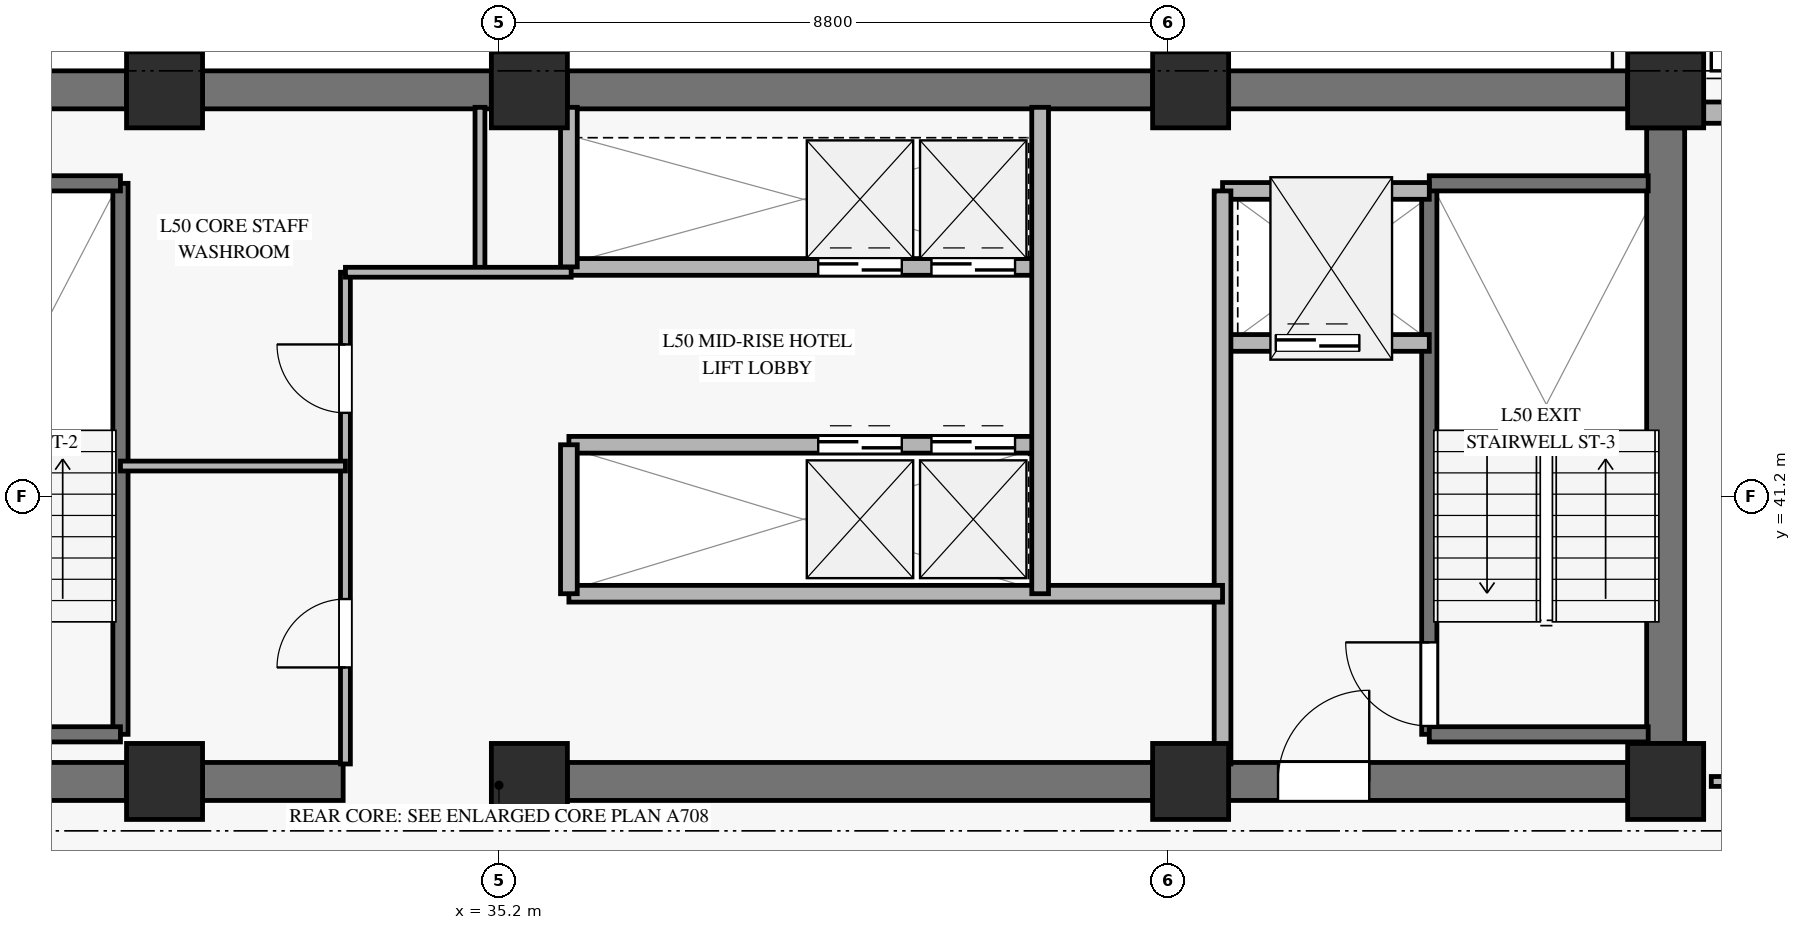
"""IFC4 building model, lengths in metres.
Left out: names, types, materials, properties, quantities, classifications, styles, units other than length and angle.
Written with IfcOpenShell. Run it as: python <this file> out.ifc"""

import sys

from ifc_helpers import new_model, si_unit, direction, frame, frame_2d, origin, origin_2d, place, context, subcontext, project, spatial, rectangle, extrude, source, transform, mapped, element, fill, save


model = new_model("IFC4")
c1 = context("Model", 3, precision=1e-05, world=origin(), true_north=direction((0.0, 1.0)))
c2 = subcontext(c1, "Body", "Model", "MODEL_VIEW")
j1 = project(units=[si_unit("LENGTHUNIT", "METRE"), si_unit("PLANEANGLEUNIT", "RADIAN")], contexts=[c1])
p1 = place(None, origin())
s1 = spatial("IfcSite", under=j1, at=p1, CompositionType="ELEMENT")
p2 = place(p1, origin())
s2 = spatial("IfcBuilding", under=s1, at=p2, CompositionType="ELEMENT")
p3 = place(p2, frame((0.0, 0.0, 199.2)))
s3 = spatial("IfcBuildingStorey", under=s2, at=p3, CompositionType="ELEMENT", Elevation=199.2)
m1 = source(origin(), c2, "Body", "SweptSolid", [
    extrude(rectangle(XDim=1.0, YDim=1.0, at=origin_2d()), origin(), (0.0, 0.0, 1.0), 3.27),
])
for number, where, z_axis, x_axis in (
    (1, (30.8, 37.45, 0.0), (0.0, 0.0, 1.0), (1.0, 0.0, 0.0)),
    (2, (30.8, 46.55, 0.0), (0.0, 0.0, 1.0), (1.0, 0.0, 0.0)),
    (3, (35.6, 37.45, 0.0), (0.0, 0.0, 1.0), (1.0, 0.0, 0.0)),
    (4, (35.6, 46.55, 0.0), (0.0, 0.0, 1.0), (1.0, 0.0, 0.0)),
    (5, (44.3, 37.45, 0.0), (0.0, 0.0, 1.0), (1.0, 0.0, 0.0)),
    (6, (44.3, 46.55, 0.0), (0.0, 0.0, 1.0), (1.0, 0.0, 0.0)),
    (7, (50.55, 37.45, 0.0), (0.0, 0.0, 1.0), (1.0, 0.0, 0.0)),
    (8, (50.55, 46.55, 0.0), (0.0, 0.0, 1.0), (1.0, 0.0, 0.0)),
):
    element("IfcColumn", number, at=place(p3, frame(where, z_axis=z_axis, x_axis=x_axis)), inside=s3, PredefinedType="PILASTER", context=c2, shape_type="MappedRepresentation", body=[
        mapped(m1, transform((0.0, 0.0, 0.0), x_axis=(1.0, 0.0, 0.0), y_axis=(0.0, 1.0, 0.0), z_axis=(0.0, 0.0, 1.0), scale=1.0)),
    ])
p4 = place(p3, frame((20.35, 46.55, 0.0), z_axis=(0.0, 0.0, 1.0), x_axis=(1.0, 0.0, 0.0)))
e9 = element("IfcWall", 9, at=p4, inside=s3, PredefinedType="SHEAR", context=c2, shape_type="SweptSolid", body=[
    extrude(rectangle(XDim=9.95, YDim=0.5, at=frame_2d((4.975, 0.0))), origin(), (0.0, 0.0, 1.0), 3.27),
])
p5 = place(p3, frame((31.3, 46.55, 0.0), z_axis=(0.0, 0.0, 1.0), x_axis=(1.0, 0.0, 0.0)))
e10 = element("IfcWall", 10, at=p5, inside=s3, PredefinedType="SHEAR", context=c2, shape_type="SweptSolid", body=[
    extrude(rectangle(XDim=3.8, YDim=0.5, at=frame_2d((1.9, 0.0))), origin(), (0.0, 0.0, 1.0), 3.27),
])
p6 = place(p3, frame((36.1, 46.55, 0.0), z_axis=(0.0, 0.0, 1.0), x_axis=(1.0, 0.0, 0.0)))
e11 = element("IfcWall", 11, at=p6, inside=s3, PredefinedType="SHEAR", context=c2, shape_type="SweptSolid", body=[
    extrude(rectangle(XDim=7.7, YDim=0.5, at=frame_2d((3.85, 0.0))), origin(), (0.0, 0.0, 1.0), 3.27),
])
p7 = place(p3, frame((44.8, 46.55, 0.0), z_axis=(0.0, 0.0, 1.0), x_axis=(1.0, 0.0, 0.0)))
e12 = element("IfcWall", 12, at=p7, inside=s3, PredefinedType="SHEAR", context=c2, shape_type="SweptSolid", body=[
    extrude(rectangle(XDim=5.25, YDim=0.5, at=frame_2d((2.625, 0.0))), origin(), (0.0, 0.0, 1.0), 3.27),
])
p8 = place(p3, frame((20.35, 37.45, 0.0), z_axis=(0.0, 0.0, 1.0), x_axis=(1.0, 0.0, 0.0)))
e13 = element("IfcWall", 13, at=p8, inside=s3, PredefinedType="SHEAR", context=c2, shape_type="SweptSolid", body=[
    extrude(rectangle(XDim=9.95, YDim=0.5, at=frame_2d((4.975, 0.0))), origin(), (0.0, 0.0, 1.0), 3.27),
])
p9 = place(p8, frame((4.2, 0.0, 0.0)))
e14 = element("IfcOpeningElement", 14, at=p9, cuts=e13, PredefinedType="OPENING", context=c2, shape_type="SweptSolid", body=[
    extrude(rectangle(XDim=1.2, YDim=2.15, at=frame_2d((0.6, 1.075))), frame((0.0, 0.26, 0.0), z_axis=(0.0, -1.0, 0.0), x_axis=(1.0, 0.0, 0.0)), (0.0, 0.0, 1.0), 0.52),
])
p10 = place(p3, frame((31.3, 37.45, 0.0), z_axis=(0.0, 0.0, 1.0), x_axis=(1.0, 0.0, 0.0)))
e15 = element("IfcWall", 15, at=p10, inside=s3, PredefinedType="SHEAR", context=c2, shape_type="SweptSolid", body=[
    extrude(rectangle(XDim=1.85, YDim=0.5, at=frame_2d((0.925, 0.0))), origin(), (0.0, 0.0, 1.0), 3.27),
])
p11 = place(p3, frame((36.1, 37.45, 0.0), z_axis=(0.0, 0.0, 1.0), x_axis=(1.0, 0.0, 0.0)))
e16 = element("IfcWall", 16, at=p11, inside=s3, PredefinedType="SHEAR", context=c2, shape_type="SweptSolid", body=[
    extrude(rectangle(XDim=7.7, YDim=0.5, at=frame_2d((3.85, 0.0))), origin(), (0.0, 0.0, 1.0), 3.27),
])
p12 = place(p3, frame((44.8, 37.45, 0.0), z_axis=(0.0, 0.0, 1.0), x_axis=(1.0, 0.0, 0.0)))
e17 = element("IfcWall", 17, at=p12, inside=s3, PredefinedType="SHEAR", context=c2, shape_type="SweptSolid", body=[
    extrude(rectangle(XDim=5.25, YDim=0.5, at=frame_2d((2.625, 0.0))), origin(), (0.0, 0.0, 1.0), 3.27),
])
p13 = place(p12, frame((0.65, 0.0, 0.0)))
e18 = element("IfcOpeningElement", 18, at=p13, cuts=e17, PredefinedType="OPENING", context=c2, shape_type="SweptSolid", body=[
    extrude(rectangle(XDim=1.2, YDim=2.15, at=frame_2d((0.6, 1.075))), frame((0.0, 0.26, 0.0), z_axis=(0.0, -1.0, 0.0), x_axis=(1.0, 0.0, 0.0)), (0.0, 0.0, 1.0), 0.52),
])
p14 = place(p3, frame((50.55, 37.95, 0.0), z_axis=(0.0, 0.0, 1.0), x_axis=(0.0, 1.0, 0.0)))
e19 = element("IfcWall", 19, at=p14, inside=s3, PredefinedType="SHEAR", context=c2, shape_type="SweptSolid", body=[
    extrude(rectangle(XDim=8.1, YDim=0.5, at=frame_2d((4.05, 0.0))), origin(), (0.0, 0.0, 1.0), 3.27),
])
p15 = place(p3, frame((51.05, 46.25, 0.0), z_axis=(0.0, 0.0, 1.0), x_axis=(1.0, 0.0, 0.0)))
e20 = element("IfcWall", 20, at=p15, inside=s3, PredefinedType="SOLIDWALL", context=c2, shape_type="SweptSolid", body=[
    extrude(rectangle(XDim=9.777, YDim=0.28, at=frame_2d((4.888, 0.0))), origin(), (0.0, 0.0, 1.0), 2.75),
])
p16 = place(p15, frame((4.089, 0.0, 0.45)))
e21 = element("IfcOpeningElement", 21, at=p16, cuts=e20, PredefinedType="OPENING", context=c2, shape_type="SweptSolid", body=[
    extrude(rectangle(XDim=1.6, YDim=2.0, at=frame_2d((0.8, 1.0))), frame((0.0, 0.15, 0.0), z_axis=(0.0, -1.0, 0.0), x_axis=(1.0, 0.0, 0.0)), (0.0, 0.0, 1.0), 0.3),
])
p17 = place(p3, frame((30.22, 38.07, 0.0), z_axis=(0.0, 0.0, 1.0), x_axis=(0.0, 1.0, 0.0)))
e22 = element("IfcWall", 22, at=p17, inside=s3, PredefinedType="SOLIDWALL", context=c2, shape_type="SweptSolid", body=[
    extrude(rectangle(XDim=7.25, YDim=0.2, at=frame_2d((3.625, 0.0))), origin(), (0.0, 0.0, 1.0), 3.5),
])
for number, where, z_axis, x_axis in (
    (23, (27.14, 45.32, 0.0), (0.0, 0.0, 1.0), (1.0, 0.0, 0.0)),
    (24, (27.14, 38.07, 0.0), (0.0, 0.0, 1.0), (1.0, 0.0, 0.0)),
):
    element("IfcWall", number, at=place(p3, frame(where, z_axis=z_axis, x_axis=x_axis)), inside=s3, PredefinedType="SOLIDWALL", context=c2, shape_type="SweptSolid", body=[
        extrude(rectangle(XDim=3.08, YDim=0.2, at=frame_2d((1.54, 0.0))), origin(), (0.0, 0.0, 1.0), 3.5),
    ])
p18 = place(p3, frame((47.44, 38.07, 0.0), z_axis=(0.0, 0.0, 1.0), x_axis=(0.0, 1.0, 0.0)))
e25 = element("IfcWall", 25, at=p18, inside=s3, PredefinedType="SOLIDWALL", context=c2, shape_type="SweptSolid", body=[
    extrude(rectangle(XDim=7.25, YDim=0.2, at=frame_2d((3.625, 0.0))), origin(), (0.0, 0.0, 1.0), 3.5),
])
p19 = place(p18, frame((0.11, 0.0, 0.0)))
e26 = element("IfcOpeningElement", 26, at=p19, cuts=e25, PredefinedType="OPENING", context=c2, shape_type="SweptSolid", body=[
    extrude(rectangle(XDim=1.1, YDim=2.15, at=frame_2d((0.55, 1.075))), frame((0.0, 0.11, 0.0), z_axis=(0.0, -1.0, 0.0), x_axis=(1.0, 0.0, 0.0)), (0.0, 0.0, 1.0), 0.22),
])
for number, where, z_axis, x_axis in (
    (27, (47.44, 45.32, 0.0), (0.0, 0.0, 1.0), (1.0, 0.0, 0.0)),
    (28, (47.44, 38.07, 0.0), (0.0, 0.0, 1.0), (1.0, 0.0, 0.0)),
):
    element("IfcWall", number, at=place(p3, frame(where, z_axis=z_axis, x_axis=x_axis)), inside=s3, PredefinedType="SOLIDWALL", context=c2, shape_type="SweptSolid", body=[
        extrude(rectangle(XDim=2.88, YDim=0.2, at=frame_2d((1.44, 0.0))), origin(), (0.0, 0.0, 1.0), 3.5),
    ])
p20 = place(p3, frame((44.72, 43.22, 0.0), z_axis=(0.0, 0.0, 1.0), x_axis=(1.0, 0.0, 0.0)))
e29 = element("IfcWall", 29, at=p20, inside=s3, PredefinedType="SOLIDWALL", context=c2, shape_type="SweptSolid", body=[
    extrude(rectangle(XDim=2.72, YDim=0.22, at=frame_2d((1.36, 0.0))), origin(), (0.0, 0.0, 1.0), 3.27),
])
p21 = place(p20, frame((0.7, 0.0, 0.0)))
e30 = element("IfcOpeningElement", 30, at=p21, cuts=e29, PredefinedType="OPENING", context=c2, shape_type="SweptSolid", body=[
    extrude(rectangle(XDim=1.1, YDim=2.2, at=frame_2d((0.55, 1.1))), frame((0.0, 0.12, 0.0), z_axis=(0.0, -1.0, 0.0), x_axis=(1.0, 0.0, 0.0)), (0.0, 0.0, 1.0), 0.24),
])
p22 = place(p3, frame((44.72, 45.22, 0.0), z_axis=(0.0, 0.0, 1.0), x_axis=(1.0, 0.0, 0.0)))
e31 = element("IfcWall", 31, at=p22, inside=s3, PredefinedType="SOLIDWALL", context=c2, shape_type="SweptSolid", body=[
    extrude(rectangle(XDim=2.72, YDim=0.22, at=frame_2d((1.36, 0.0))), origin(), (0.0, 0.0, 1.0), 3.27),
])
p23 = place(p3, frame((44.72, 37.68, 0.0), z_axis=(0.0, 0.0, 1.0), x_axis=(0.0, 1.0, 0.0)))
e32 = element("IfcWall", 32, at=p23, inside=s3, PredefinedType="SOLIDWALL", context=c2, shape_type="SweptSolid", body=[
    extrude(rectangle(XDim=7.54, YDim=0.22, at=frame_2d((3.77, 0.0))), origin(), (0.0, 0.0, 1.0), 3.27),
])
p24 = place(p3, frame((36.12, 44.22, 0.0), z_axis=(0.0, 0.0, 1.0), x_axis=(1.0, 0.0, 0.0)))
e33 = element("IfcWall", 33, at=p24, inside=s3, PredefinedType="SOLIDWALL", context=c2, shape_type="SweptSolid", body=[
    extrude(rectangle(XDim=6.2, YDim=0.22, at=frame_2d((3.1, 0.0))), origin(), (0.0, 0.0, 1.0), 3.27),
])
p25 = place(p24, frame((3.28, 0.0, 0.0)))
e34 = element("IfcOpeningElement", 34, at=p25, cuts=e33, PredefinedType="OPENING", context=c2, shape_type="SweptSolid", body=[
    extrude(rectangle(XDim=1.1, YDim=2.2, at=frame_2d((0.55, 1.1))), frame((0.0, 0.12, 0.0), z_axis=(0.0, -1.0, 0.0), x_axis=(1.0, 0.0, 0.0)), (0.0, 0.0, 1.0), 0.24),
])
p26 = place(p24, frame((4.77, 0.0, 0.0)))
e35 = element("IfcOpeningElement", 35, at=p26, cuts=e33, PredefinedType="OPENING", context=c2, shape_type="SweptSolid", body=[
    extrude(rectangle(XDim=1.1, YDim=2.2, at=frame_2d((0.55, 1.1))), frame((0.0, 0.12, 0.0), z_axis=(0.0, -1.0, 0.0), x_axis=(1.0, 0.0, 0.0)), (0.0, 0.0, 1.0), 0.24),
])
p27 = place(p3, frame((36.12, 41.88, 0.0), z_axis=(0.0, 0.0, 1.0), x_axis=(1.0, 0.0, 0.0)))
e36 = element("IfcWall", 36, at=p27, inside=s3, PredefinedType="SOLIDWALL", context=c2, shape_type="SweptSolid", body=[
    extrude(rectangle(XDim=6.2, YDim=0.22, at=frame_2d((3.1, 0.0))), origin(), (0.0, 0.0, 1.0), 3.27),
])
p28 = place(p27, frame((3.28, 0.0, 0.0)))
e37 = element("IfcOpeningElement", 37, at=p28, cuts=e36, PredefinedType="OPENING", context=c2, shape_type="SweptSolid", body=[
    extrude(rectangle(XDim=1.1, YDim=2.2, at=frame_2d((0.55, 1.1))), frame((0.0, 0.12, 0.0), z_axis=(0.0, -1.0, 0.0), x_axis=(1.0, 0.0, 0.0)), (0.0, 0.0, 1.0), 0.24),
])
p29 = place(p27, frame((4.77, 0.0, 0.0)))
e38 = element("IfcOpeningElement", 38, at=p29, cuts=e36, PredefinedType="OPENING", context=c2, shape_type="SweptSolid", body=[
    extrude(rectangle(XDim=1.1, YDim=2.2, at=frame_2d((0.55, 1.1))), frame((0.0, 0.12, 0.0), z_axis=(0.0, -1.0, 0.0), x_axis=(1.0, 0.0, 0.0)), (0.0, 0.0, 1.0), 0.24),
])
p30 = place(p3, frame((36.12, 39.92, 0.0), z_axis=(0.0, 0.0, 1.0), x_axis=(1.0, 0.0, 0.0)))
e39 = element("IfcWall", 39, at=p30, inside=s3, PredefinedType="SOLIDWALL", context=c2, shape_type="SweptSolid", body=[
    extrude(rectangle(XDim=8.6, YDim=0.22, at=frame_2d((4.3, 0.0))), origin(), (0.0, 0.0, 1.0), 2.555),
])
p31 = place(p3, frame((42.32, 39.92, 0.0), z_axis=(0.0, 0.0, 1.0), x_axis=(0.0, 1.0, 0.0)))
e40 = element("IfcWall", 40, at=p31, inside=s3, PredefinedType="SOLIDWALL", context=c2, shape_type="SweptSolid", body=[
    extrude(rectangle(XDim=6.4, YDim=0.22, at=frame_2d((3.2, 0.0))), origin(), (0.0, 0.0, 1.0), 3.27),
])
p32 = place(p3, frame((36.12, 39.92, 0.0), z_axis=(0.0, 0.0, 1.0), x_axis=(0.0, 1.0, 0.0)))
e41 = element("IfcWall", 41, at=p32, inside=s3, PredefinedType="SOLIDWALL", context=c2, shape_type="SweptSolid", body=[
    extrude(rectangle(XDim=1.96, YDim=0.22, at=frame_2d((0.98, 0.0))), origin(), (0.0, 0.0, 1.0), 3.27),
])
p33 = place(p3, frame((36.12, 44.22, 0.0), z_axis=(0.0, 0.0, 1.0), x_axis=(0.0, 1.0, 0.0)))
e42 = element("IfcWall", 42, at=p33, inside=s3, PredefinedType="SOLIDWALL", context=c2, shape_type="SweptSolid", body=[
    extrude(rectangle(XDim=2.1, YDim=0.22, at=frame_2d((1.05, 0.0))), origin(), (0.0, 0.0, 1.0), 3.27),
])
p34 = place(p3, frame((33.18, 37.68, 0.0), z_axis=(0.0, 0.0, 1.0), x_axis=(0.0, 1.0, 0.0)))
e43 = element("IfcWall", 43, at=p34, inside=s3, PredefinedType="PARTITIONING", context=c2, shape_type="SweptSolid", body=[
    extrude(rectangle(XDim=6.47, YDim=0.13, at=frame_2d((3.235, 0.0))), origin(), (0.0, 0.0, 1.0), 2.355),
])
p35 = place(p34, frame((1.27, 0.0, 0.0)))
e44 = element("IfcOpeningElement", 44, at=p35, cuts=e43, PredefinedType="OPENING", context=c2, shape_type="SweptSolid", body=[
    extrude(rectangle(XDim=0.9, YDim=2.1, at=frame_2d((0.45, 1.05))), frame((0.0, 0.075, 0.0), z_axis=(0.0, -1.0, 0.0), x_axis=(1.0, 0.0, 0.0)), (0.0, 0.0, 1.0), 0.15),
])
p36 = place(p34, frame((4.62, 0.0, 0.0)))
e45 = element("IfcOpeningElement", 45, at=p36, cuts=e43, PredefinedType="OPENING", context=c2, shape_type="SweptSolid", body=[
    extrude(rectangle(XDim=0.9, YDim=2.1, at=frame_2d((0.45, 1.05))), frame((0.0, 0.075, 0.0), z_axis=(0.0, -1.0, 0.0), x_axis=(1.0, 0.0, 0.0)), (0.0, 0.0, 1.0), 0.15),
])
p37 = place(p3, frame((34.95, 44.15, 0.0), z_axis=(0.0, 0.0, 1.0), x_axis=(0.0, 1.0, 0.0)))
e46 = element("IfcWall", 46, at=p37, inside=s3, PredefinedType="PARTITIONING", context=c2, shape_type="SweptSolid", body=[
    extrude(rectangle(XDim=2.17, YDim=0.13, at=frame_2d((1.085, 0.0))), origin(), (0.0, 0.0, 1.0), 3.27),
])
p38 = place(p3, frame((33.18, 44.15, 0.0), z_axis=(0.0, 0.0, 1.0), x_axis=(1.0, 0.0, 0.0)))
e47 = element("IfcWall", 47, at=p38, inside=s3, PredefinedType="PARTITIONING", context=c2, shape_type="SweptSolid", body=[
    extrude(rectangle(XDim=2.97, YDim=0.13, at=frame_2d((1.485, 0.0))), origin(), (0.0, 0.0, 1.0), 2.555),
])
p39 = place(p3, frame((30.22, 41.6, 0.0), z_axis=(0.0, 0.0, 1.0), x_axis=(1.0, 0.0, 0.0)))
e48 = element("IfcWall", 48, at=p39, inside=s3, PredefinedType="PARTITIONING", context=c2, shape_type="SweptSolid", body=[
    extrude(rectangle(XDim=2.96, YDim=0.13, at=frame_2d((1.48, 0.0))), origin(), (0.0, 0.0, 1.0), 2.555),
])
p40 = place(p3, frame((51.15, 37.45, 0.0), z_axis=(0.0, 0.0, 1.0), x_axis=(1.0, 0.0, 0.0)))
e49 = element("IfcWall", 49, at=p40, inside=s3, PredefinedType="PARTITIONING", context=c2, shape_type="SweptSolid", body=[
    extrude(rectangle(XDim=12.862, YDim=0.13, at=frame_2d((6.431, 0.0))), origin(), (0.0, 0.0, 1.0), 2.755),
])
p41 = place(p40, frame((0.5, 0.0, 0.0)))
e50 = element("IfcOpeningElement", 50, at=p41, cuts=e49, PredefinedType="OPENING", context=c2, shape_type="SweptSolid", body=[
    extrude(rectangle(XDim=0.9, YDim=2.1, at=frame_2d((0.45, 1.05))), frame((0.0, 0.075, 0.0), z_axis=(0.0, -1.0, 0.0), x_axis=(1.0, 0.0, 0.0)), (0.0, 0.0, 1.0), 0.15),
])
p42 = place(p40, frame((9.224, 0.0, 0.0)))
e51 = element("IfcOpeningElement", 51, at=p42, cuts=e49, PredefinedType="OPENING", context=c2, shape_type="SweptSolid", body=[
    extrude(rectangle(XDim=0.95, YDim=2.1, at=frame_2d((0.475, 1.05))), frame((0.0, 0.075, 0.0), z_axis=(0.0, -1.0, 0.0), x_axis=(1.0, 0.0, 0.0)), (0.0, 0.0, 1.0), 0.15),
])
m2 = source(origin(), c2, "Body", "SweptSolid", [
    extrude(rectangle(XDim=1.1, YDim=2.15, at=frame_2d((0.55, 1.075))), frame((0.0, 0.025, 0.0), z_axis=(0.0, -1.0, 0.0), x_axis=(1.0, 0.0, 0.0)), (0.0, 0.0, 1.0), 0.05),
])
p43 = place(p19, origin())
e52 = element("IfcDoor", 52, at=p43, inside=s3, OperationType="SINGLE_SWING_RIGHT", PredefinedType="DOOR", context=c2, shape_type="MappedRepresentation", body=[
    mapped(m2, transform((0.0, 0.0, 0.0), x_axis=(1.0, 0.0, 0.0), y_axis=(0.0, 1.0, 0.0), z_axis=(0.0, 0.0, 1.0), scale=1.0)),
])
fill(e26, e52)
m3 = source(origin(), c2, "Body", "SweptSolid", [
    extrude(rectangle(XDim=1.1, YDim=2.2, at=frame_2d((0.55, 1.1))), frame((0.0, 0.025, 0.0), z_axis=(0.0, -1.0, 0.0), x_axis=(1.0, 0.0, 0.0)), (0.0, 0.0, 1.0), 0.05),
])
p44 = place(p21, origin())
e53 = element("IfcDoor", 53, at=p44, inside=s3, OperationType="SLIDING_TO_LEFT", PredefinedType="DOOR", context=c2, shape_type="MappedRepresentation", body=[
    mapped(m3, transform((0.0, 0.0, 0.0), x_axis=(1.0, 0.0, 0.0), y_axis=(0.0, 1.0, 0.0), z_axis=(0.0, 0.0, 1.0), scale=1.0)),
])
fill(e30, e53)
m4 = source(origin(), c2, "Body", "SweptSolid", [
    extrude(rectangle(XDim=1.2, YDim=2.15, at=frame_2d((0.6, 1.075))), frame((0.0, 0.025, 0.0), z_axis=(0.0, -1.0, 0.0), x_axis=(1.0, 0.0, 0.0)), (0.0, 0.0, 1.0), 0.05),
])
p45 = place(p13, origin())
e54 = element("IfcDoor", 54, at=p45, inside=s3, OperationType="SINGLE_SWING_RIGHT", PredefinedType="DOOR", context=c2, shape_type="MappedRepresentation", body=[
    mapped(m4, transform((0.0, 0.0, 0.0), x_axis=(1.0, 0.0, 0.0), y_axis=(0.0, 1.0, 0.0), z_axis=(0.0, 0.0, 1.0), scale=1.0)),
])
fill(e18, e54)
p46 = place(p25, origin())
e55 = element("IfcDoor", 55, at=p46, inside=s3, OperationType="SLIDING_TO_LEFT", PredefinedType="DOOR", context=c2, shape_type="MappedRepresentation", body=[
    mapped(m3, transform((0.0, 0.0, 0.0), x_axis=(1.0, 0.0, 0.0), y_axis=(0.0, 1.0, 0.0), z_axis=(0.0, 0.0, 1.0), scale=1.0)),
])
fill(e34, e55)
p47 = place(p26, origin())
e56 = element("IfcDoor", 56, at=p47, inside=s3, OperationType="SLIDING_TO_LEFT", PredefinedType="DOOR", context=c2, shape_type="MappedRepresentation", body=[
    mapped(m3, transform((0.0, 0.0, 0.0), x_axis=(1.0, 0.0, 0.0), y_axis=(0.0, 1.0, 0.0), z_axis=(0.0, 0.0, 1.0), scale=1.0)),
])
fill(e35, e56)
p48 = place(p28, origin())
e57 = element("IfcDoor", 57, at=p48, inside=s3, OperationType="SLIDING_TO_LEFT", PredefinedType="DOOR", context=c2, shape_type="MappedRepresentation", body=[
    mapped(m3, transform((0.0, 0.0, 0.0), x_axis=(1.0, 0.0, 0.0), y_axis=(0.0, 1.0, 0.0), z_axis=(0.0, 0.0, 1.0), scale=1.0)),
])
fill(e37, e57)
p49 = place(p29, origin())
e58 = element("IfcDoor", 58, at=p49, inside=s3, OperationType="SLIDING_TO_LEFT", PredefinedType="DOOR", context=c2, shape_type="MappedRepresentation", body=[
    mapped(m3, transform((0.0, 0.0, 0.0), x_axis=(1.0, 0.0, 0.0), y_axis=(0.0, 1.0, 0.0), z_axis=(0.0, 0.0, 1.0), scale=1.0)),
])
fill(e38, e58)
m5 = source(origin(), c2, "Body", "SweptSolid", [
    extrude(rectangle(XDim=0.9, YDim=2.1, at=frame_2d((0.45, 1.05))), frame((0.0, 0.025, 0.0), z_axis=(0.0, -1.0, 0.0), x_axis=(1.0, 0.0, 0.0)), (0.0, 0.0, 1.0), 0.05),
])
p50 = place(p35, origin())
e59 = element("IfcDoor", 59, at=p50, inside=s3, OperationType="SINGLE_SWING_LEFT", PredefinedType="DOOR", context=c2, shape_type="MappedRepresentation", body=[
    mapped(m5, transform((0.0, 0.0, 0.0), x_axis=(1.0, 0.0, 0.0), y_axis=(0.0, 1.0, 0.0), z_axis=(0.0, 0.0, 1.0), scale=1.0)),
])
fill(e44, e59)
p51 = place(p36, origin())
e60 = element("IfcDoor", 60, at=p51, inside=s3, OperationType="SINGLE_SWING_RIGHT", PredefinedType="DOOR", context=c2, shape_type="MappedRepresentation", body=[
    mapped(m5, transform((0.0, 0.0, 0.0), x_axis=(1.0, 0.0, 0.0), y_axis=(0.0, 1.0, 0.0), z_axis=(0.0, 0.0, 1.0), scale=1.0)),
])
fill(e45, e60)
save(model, sys.argv[1])
